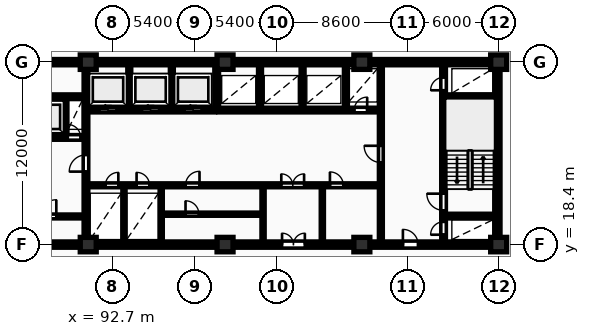
"""IFC4 building model, lengths in metres.
Left out: names, types, materials, properties, quantities, classifications, styles, units other than length and angle.
Written with IfcOpenShell. Run it as: python <this file> out.ifc"""

import sys

from ifc_helpers import new_model, si_unit, direction, frame, frame_2d, origin, origin_2d, place, context, subcontext, project, spatial, rectangle, extrude, element, fill, save


model = new_model("IFC4")
c1 = context("Model", 3, precision=1e-05, world=origin(), true_north=direction((0.0, 1.0)))
c2 = subcontext(c1, "Body", "Model", "MODEL_VIEW")
j1 = project(units=[si_unit("LENGTHUNIT", "METRE"), si_unit("PLANEANGLEUNIT", "RADIAN")], contexts=[c1])
p1 = place(None, origin())
s1 = spatial("IfcSite", under=j1, at=p1, CompositionType="ELEMENT")
p2 = place(p1, origin())
s2 = spatial("IfcBuilding", under=s1, at=p2, CompositionType="ELEMENT")
p3 = place(p2, frame((0.0, 0.0, -7.2)))
s3 = spatial("IfcBuildingStorey", under=s2, at=p3, CompositionType="ELEMENT", Elevation=-7.2)
for number, where, z_axis, x_axis in (
    (1, (91.1, 18.4, 0.0), (0.0, 0.0, 1.0), (1.0, 0.0, 0.0)),
    (2, (91.1, 30.4, 0.0), (0.0, 0.0, 1.0), (1.0, 0.0, 0.0)),
    (3, (100.1, 18.4, 0.0), (0.0, 0.0, 1.0), (1.0, 0.0, 0.0)),
    (4, (100.1, 30.4, 0.0), (0.0, 0.0, 1.0), (1.0, 0.0, 0.0)),
    (5, (109.1, 18.4, 0.0), (0.0, 0.0, 1.0), (1.0, 0.0, 0.0)),
    (6, (109.1, 30.4, 0.0), (0.0, 0.0, 1.0), (1.0, 0.0, 0.0)),
    (7, (118.1, 18.4, 0.0), (0.0, 0.0, 1.0), (1.0, 0.0, 0.0)),
    (8, (118.1, 30.4, 0.0), (0.0, 0.0, 1.0), (1.0, 0.0, 0.0)),
):
    element("IfcColumn", number, at=place(p3, frame(where, z_axis=z_axis, x_axis=x_axis)), inside=s3, PredefinedType="COLUMN", context=c2, shape_type="SweptSolid", body=[
        extrude(rectangle(XDim=1.05, YDim=0.95, at=origin_2d()), origin(), (0.0, 0.0, 1.0), 3.6),
    ])
p4 = place(p3, frame((81.925, 30.4, 0.0), z_axis=(0.0, 0.0, 1.0), x_axis=(1.0, 0.0, 0.0)))
e9 = element("IfcWall", 9, at=p4, inside=s3, PredefinedType="SHEAR", context=c2, shape_type="SweptSolid", body=[
    extrude(rectangle(XDim=36.265, YDim=0.35, at=frame_2d((18.132, 0.0))), origin(), (0.0, 0.0, 1.0), 3.6),
])
p5 = place(p3, frame((118.015, 18.575, 0.0), z_axis=(0.0, 0.0, 1.0), x_axis=(0.0, 1.0, 0.0)))
e10 = element("IfcWall", 10, at=p5, inside=s3, PredefinedType="SHEAR", context=c2, shape_type="SweptSolid", body=[
    extrude(rectangle(XDim=11.65, YDim=0.35, at=frame_2d((5.825, 0.0))), origin(), (0.0, 0.0, 1.0), 3.6),
])
p6 = place(p3, frame((81.925, 18.4, 0.0), z_axis=(0.0, 0.0, 1.0), x_axis=(1.0, 0.0, 0.0)))
e11 = element("IfcWall", 11, at=p6, inside=s3, PredefinedType="SHEAR", context=c2, shape_type="SweptSolid", body=[
    extrude(rectangle(XDim=36.265, YDim=0.35, at=frame_2d((18.132, 0.0))), origin(), (0.0, 0.0, 1.0), 3.6),
])
p7 = place(p6, frame((5.675, 0.0, 0.0)))
e12 = element("IfcOpeningElement", 12, at=p7, cuts=e11, PredefinedType="OPENING", context=c2, shape_type="SweptSolid", body=[
    extrude(rectangle(XDim=1.0, YDim=2.15, at=frame_2d((0.5, 1.075))), frame((0.0, 0.185, 0.0), z_axis=(0.0, -1.0, 0.0), x_axis=(1.0, 0.0, 0.0)), (0.0, 0.0, 1.0), 0.37),
])
p8 = place(p6, frame((21.925, 0.0, 0.0)))
e13 = element("IfcOpeningElement", 13, at=p8, cuts=e11, PredefinedType="OPENING", context=c2, shape_type="SweptSolid", body=[
    extrude(rectangle(XDim=1.5, YDim=2.2, at=frame_2d((0.75, 1.1))), frame((0.0, 0.185, 0.0), z_axis=(0.0, -1.0, 0.0), x_axis=(1.0, 0.0, 0.0)), (0.0, 0.0, 1.0), 0.37),
])
p9 = place(p6, frame((29.875, 0.0, 0.0)))
e14 = element("IfcOpeningElement", 14, at=p9, cuts=e11, PredefinedType="OPENING", context=c2, shape_type="SweptSolid", body=[
    extrude(rectangle(XDim=1.0, YDim=2.15, at=frame_2d((0.5, 1.075))), frame((0.0, 0.185, 0.0), z_axis=(0.0, -1.0, 0.0), x_axis=(1.0, 0.0, 0.0)), (0.0, 0.0, 1.0), 0.37),
])
p10 = place(p3, frame((83.0, 28.125, 0.0), z_axis=(0.0, 0.0, 1.0), x_axis=(1.0, 0.0, 0.0)))
e15 = element("IfcWall", 15, at=p10, inside=s3, PredefinedType="SHEAR", context=c2, shape_type="SweptSolid", body=[
    extrude(rectangle(XDim=7.82, YDim=0.25, at=frame_2d((3.91, 0.0))), origin(), (0.0, 0.0, 1.0), 3.6),
])
p11 = place(p3, frame((86.5, 25.45, 0.0), z_axis=(0.0, 0.0, 1.0), x_axis=(1.0, 0.0, 0.0)))
e16 = element("IfcWall", 16, at=p11, inside=s3, PredefinedType="SHEAR", context=c2, shape_type="SweptSolid", body=[
    extrude(rectangle(XDim=4.32, YDim=0.25, at=frame_2d((2.16, 0.0))), origin(), (0.0, 0.0, 1.0), 3.6),
])
p12 = place(p11, frame((1.14, 0.0, 0.0)))
e17 = element("IfcOpeningElement", 17, at=p12, cuts=e16, PredefinedType="OPENING", context=c2, shape_type="SweptSolid", body=[
    extrude(rectangle(XDim=1.12, YDim=2.12, at=frame_2d((0.56, 1.06))), frame((0.0, 0.135, 0.0), z_axis=(0.0, -1.0, 0.0), x_axis=(1.0, 0.0, 0.0)), (0.0, 0.0, 1.0), 0.27),
])
p13 = place(p11, frame((3.25, 0.0, 0.0)))
e18 = element("IfcOpeningElement", 18, at=p13, cuts=e16, PredefinedType="OPENING", context=c2, shape_type="SweptSolid", body=[
    extrude(rectangle(XDim=0.85, YDim=2.05, at=frame_2d((0.425, 1.025))), frame((0.0, 0.135, 0.0), z_axis=(0.0, -1.0, 0.0), x_axis=(1.0, 0.0, 0.0)), (0.0, 0.0, 1.0), 0.27),
])
p14 = place(p3, frame((89.6, 25.58, 0.0), z_axis=(0.0, 0.0, 1.0), x_axis=(0.0, 1.0, 0.0)))
e19 = element("IfcWall", 19, at=p14, inside=s3, PredefinedType="PARTITIONING", context=c2, shape_type="SweptSolid", body=[
    extrude(rectangle(XDim=2.42, YDim=0.2, at=frame_2d((1.21, 0.0))), origin(), (0.0, 0.0, 1.0), 3.3),
])
p15 = place(p3, frame((86.5, 20.25, 0.0), z_axis=(0.0, 0.0, 1.0), x_axis=(1.0, 0.0, 0.0)))
e20 = element("IfcWall", 20, at=p15, inside=s3, PredefinedType="PARTITIONING", context=c2, shape_type="SweptSolid", body=[
    extrude(rectangle(XDim=4.32, YDim=0.2, at=frame_2d((2.16, 0.0))), origin(), (0.0, 0.0, 1.0), 3.3),
])
p16 = place(p15, frame((1.4, 0.0, 0.0)))
e21 = element("IfcOpeningElement", 21, at=p16, cuts=e20, PredefinedType="OPENING", context=c2, shape_type="SweptSolid", body=[
    extrude(rectangle(XDim=1.1, YDim=2.1, at=frame_2d((0.55, 1.05))), frame((0.0, 0.11, 0.0), z_axis=(0.0, -1.0, 0.0), x_axis=(1.0, 0.0, 0.0)), (0.0, 0.0, 1.0), 0.22),
])
p17 = place(p3, frame((90.95, 18.6, 0.0), z_axis=(0.0, 0.0, 1.0), x_axis=(0.0, 1.0, 0.0)))
e22 = element("IfcWall", 22, at=p17, inside=s3, PredefinedType="SHEAR", context=c2, shape_type="SweptSolid", body=[
    extrude(rectangle(XDim=11.6, YDim=0.25, at=frame_2d((5.8, 0.0))), origin(), (0.0, 0.0, 1.0), 3.6),
])
p18 = place(p17, frame((4.6, 0.0, 0.0)))
e23 = element("IfcOpeningElement", 23, at=p18, cuts=e22, PredefinedType="OPENING", context=c2, shape_type="SweptSolid", body=[
    extrude(rectangle(XDim=1.1, YDim=2.1, at=frame_2d((0.55, 1.05))), frame((0.0, 0.135, 0.0), z_axis=(0.0, -1.0, 0.0), x_axis=(1.0, 0.0, 0.0)), (0.0, 0.0, 1.0), 0.27),
])
for number, where, z_axis, x_axis in (
    (24, (93.8, 27.38, 0.0), (0.0, 0.0, 1.0), (0.0, 1.0, 0.0)),
    (25, (96.6, 27.38, 0.0), (0.0, 0.0, 1.0), (0.0, 1.0, 0.0)),
):
    element("IfcWall", number, at=place(p3, frame(where, z_axis=z_axis, x_axis=x_axis)), inside=s3, PredefinedType="PARTITIONING", context=c2, shape_type="SweptSolid", body=[
        extrude(rectangle(XDim=2.82, YDim=0.2, at=frame_2d((1.41, 0.0))), origin(), (0.0, 0.0, 1.0), 3.3),
    ])
p19 = place(p3, frame((91.08, 27.25, 0.0), z_axis=(0.0, 0.0, 1.0), x_axis=(1.0, 0.0, 0.0)))
e26 = element("IfcWall", 26, at=p19, inside=s3, PredefinedType="SHEAR", context=c2, shape_type="SweptSolid", body=[
    extrude(rectangle(XDim=8.34, YDim=0.25, at=frame_2d((4.17, 0.0))), origin(), (0.0, 0.0, 1.0), 3.6),
])
p20 = place(p19, frame((0.76, 0.0, 0.0)))
e27 = element("IfcOpeningElement", 27, at=p20, cuts=e26, PredefinedType="OPENING", context=c2, shape_type="SweptSolid", body=[
    extrude(rectangle(XDim=1.12, YDim=2.12, at=frame_2d((0.56, 1.06))), frame((0.0, 0.135, 0.0), z_axis=(0.0, -1.0, 0.0), x_axis=(1.0, 0.0, 0.0)), (0.0, 0.0, 1.0), 0.27),
])
p21 = place(p19, frame((3.56, 0.0, 0.0)))
e28 = element("IfcOpeningElement", 28, at=p21, cuts=e26, PredefinedType="OPENING", context=c2, shape_type="SweptSolid", body=[
    extrude(rectangle(XDim=1.12, YDim=2.12, at=frame_2d((0.56, 1.06))), frame((0.0, 0.135, 0.0), z_axis=(0.0, -1.0, 0.0), x_axis=(1.0, 0.0, 0.0)), (0.0, 0.0, 1.0), 0.27),
])
p22 = place(p19, frame((6.36, 0.0, 0.0)))
e29 = element("IfcOpeningElement", 29, at=p22, cuts=e26, PredefinedType="OPENING", context=c2, shape_type="SweptSolid", body=[
    extrude(rectangle(XDim=1.12, YDim=2.12, at=frame_2d((0.56, 1.06))), frame((0.0, 0.135, 0.0), z_axis=(0.0, -1.0, 0.0), x_axis=(1.0, 0.0, 0.0)), (0.0, 0.0, 1.0), 0.27),
])
p23 = place(p3, frame((99.55, 27.25, 0.0), z_axis=(0.0, 0.0, 1.0), x_axis=(0.0, 1.0, 0.0)))
e30 = element("IfcWall", 30, at=p23, inside=s3, PredefinedType="SHEAR", context=c2, shape_type="SweptSolid", body=[
    extrude(rectangle(XDim=2.95, YDim=0.25, at=frame_2d((1.475, 0.0))), origin(), (0.0, 0.0, 1.0), 3.6),
])
for number, where, z_axis, x_axis in (
    (31, (102.4, 27.38, 0.0), (0.0, 0.0, 1.0), (0.0, 1.0, 0.0)),
    (32, (105.2, 27.38, 0.0), (0.0, 0.0, 1.0), (0.0, 1.0, 0.0)),
    (33, (108.05, 27.38, 0.0), (0.0, 0.0, 1.0), (0.0, 1.0, 0.0)),
):
    element("IfcWall", number, at=place(p3, frame(where, z_axis=z_axis, x_axis=x_axis)), inside=s3, PredefinedType="PARTITIONING", context=c2, shape_type="SweptSolid", body=[
        extrude(rectangle(XDim=2.82, YDim=0.2, at=frame_2d((1.41, 0.0))), origin(), (0.0, 0.0, 1.0), 3.3),
    ])
p24 = place(p3, frame((99.68, 27.25, 0.0), z_axis=(0.0, 0.0, 1.0), x_axis=(1.0, 0.0, 0.0)))
e34 = element("IfcWall", 34, at=p24, inside=s3, PredefinedType="SHEAR", context=c2, shape_type="SweptSolid", body=[
    extrude(rectangle(XDim=10.54, YDim=0.25, at=frame_2d((5.27, 0.0))), origin(), (0.0, 0.0, 1.0), 3.6),
])
p25 = place(p24, frame((8.92, 0.0, 0.0)))
e35 = element("IfcOpeningElement", 35, at=p25, cuts=e34, PredefinedType="OPENING", context=c2, shape_type="SweptSolid", body=[
    extrude(rectangle(XDim=0.85, YDim=2.05, at=frame_2d((0.425, 1.025))), frame((0.0, 0.135, 0.0), z_axis=(0.0, -1.0, 0.0), x_axis=(1.0, 0.0, 0.0)), (0.0, 0.0, 1.0), 0.27),
])
for number, where, z_axis, x_axis in (
    (36, (93.45, 18.6, 0.0), (0.0, 0.0, 1.0), (0.0, 1.0, 0.0)),
    (37, (95.9, 18.6, 0.0), (0.0, 0.0, 1.0), (0.0, 1.0, 0.0)),
):
    element("IfcWall", number, at=place(p3, frame(where, z_axis=z_axis, x_axis=x_axis)), inside=s3, PredefinedType="PARTITIONING", context=c2, shape_type="SweptSolid", body=[
        extrude(rectangle(XDim=3.6, YDim=0.15, at=frame_2d((1.8, 0.0))), origin(), (0.0, 0.0, 1.0), 3.3),
    ])
p26 = place(p3, frame((95.9, 20.4, 0.0), z_axis=(0.0, 0.0, 1.0), x_axis=(1.0, 0.0, 0.0)))
e38 = element("IfcWall", 38, at=p26, inside=s3, PredefinedType="PARTITIONING", context=c2, shape_type="SweptSolid", body=[
    extrude(rectangle(XDim=6.7, YDim=0.15, at=frame_2d((3.35, 0.0))), origin(), (0.0, 0.0, 1.0), 3.3),
])
p27 = place(p26, frame((1.6, 0.0, 0.0)))
e39 = element("IfcOpeningElement", 39, at=p27, cuts=e38, PredefinedType="OPENING", context=c2, shape_type="SweptSolid", body=[
    extrude(rectangle(XDim=0.88, YDim=2.06, at=frame_2d((0.44, 1.03))), frame((0.0, 0.085, 0.0), z_axis=(0.0, -1.0, 0.0), x_axis=(1.0, 0.0, 0.0)), (0.0, 0.0, 1.0), 0.17),
])
for number, where, z_axis, x_axis in (
    (40, (102.6, 18.6, 0.0), (0.0, 0.0, 1.0), (0.0, 1.0, 0.0)),
    (41, (106.5, 18.6, 0.0), (0.0, 0.0, 1.0), (0.0, 1.0, 0.0)),
):
    element("IfcWall", number, at=place(p3, frame(where, z_axis=z_axis, x_axis=x_axis)), inside=s3, PredefinedType="PARTITIONING", context=c2, shape_type="SweptSolid", body=[
        extrude(rectangle(XDim=3.6, YDim=0.15, at=frame_2d((1.8, 0.0))), origin(), (0.0, 0.0, 1.0), 3.3),
    ])
p28 = place(p3, frame((91.08, 22.3, 0.0), z_axis=(0.0, 0.0, 1.0), x_axis=(1.0, 0.0, 0.0)))
e42 = element("IfcWall", 42, at=p28, inside=s3, PredefinedType="PARTITIONING", context=c2, shape_type="SweptSolid", body=[
    extrude(rectangle(XDim=19.14, YDim=0.2, at=frame_2d((9.57, 0.0))), origin(), (0.0, 0.0, 1.0), 3.3),
])
p29 = place(p28, frame((1.15, 0.0, 0.0)))
e43 = element("IfcOpeningElement", 43, at=p29, cuts=e42, PredefinedType="OPENING", context=c2, shape_type="SweptSolid", body=[
    extrude(rectangle(XDim=0.85, YDim=2.05, at=frame_2d((0.425, 1.025))), frame((0.0, 0.11, 0.0), z_axis=(0.0, -1.0, 0.0), x_axis=(1.0, 0.0, 0.0)), (0.0, 0.0, 1.0), 0.22),
])
p30 = place(p28, frame((3.2, 0.0, 0.0)))
e44 = element("IfcOpeningElement", 44, at=p30, cuts=e42, PredefinedType="OPENING", context=c2, shape_type="SweptSolid", body=[
    extrude(rectangle(XDim=0.85, YDim=2.05, at=frame_2d((0.425, 1.025))), frame((0.0, 0.11, 0.0), z_axis=(0.0, -1.0, 0.0), x_axis=(1.0, 0.0, 0.0)), (0.0, 0.0, 1.0), 0.22),
])
p31 = place(p28, frame((12.72, 0.0, 0.0)))
e45 = element("IfcOpeningElement", 45, at=p31, cuts=e42, PredefinedType="OPENING", context=c2, shape_type="SweptSolid", body=[
    extrude(rectangle(XDim=1.5, YDim=2.2, at=frame_2d((0.75, 1.1))), frame((0.0, 0.11, 0.0), z_axis=(0.0, -1.0, 0.0), x_axis=(1.0, 0.0, 0.0)), (0.0, 0.0, 1.0), 0.22),
])
p32 = place(p28, frame((6.42, 0.0, 0.0)))
e46 = element("IfcOpeningElement", 46, at=p32, cuts=e42, PredefinedType="OPENING", context=c2, shape_type="SweptSolid", body=[
    extrude(rectangle(XDim=0.92, YDim=2.08, at=frame_2d((0.46, 1.04))), frame((0.0, 0.11, 0.0), z_axis=(0.0, -1.0, 0.0), x_axis=(1.0, 0.0, 0.0)), (0.0, 0.0, 1.0), 0.22),
])
p33 = place(p28, frame((15.92, 0.0, 0.0)))
e47 = element("IfcOpeningElement", 47, at=p33, cuts=e42, PredefinedType="OPENING", context=c2, shape_type="SweptSolid", body=[
    extrude(rectangle(XDim=0.88, YDim=2.06, at=frame_2d((0.44, 1.03))), frame((0.0, 0.11, 0.0), z_axis=(0.0, -1.0, 0.0), x_axis=(1.0, 0.0, 0.0)), (0.0, 0.0, 1.0), 0.22),
])
p34 = place(p3, frame((110.35, 18.6, 0.0), z_axis=(0.0, 0.0, 1.0), x_axis=(0.0, 1.0, 0.0)))
e48 = element("IfcWall", 48, at=p34, inside=s3, PredefinedType="PARTITIONING", context=c2, shape_type="SweptSolid", body=[
    extrude(rectangle(XDim=11.6, YDim=0.2, at=frame_2d((5.8, 0.0))), origin(), (0.0, 0.0, 1.0), 3.3),
])
p35 = place(p34, frame((5.2, 0.0, 0.0)))
e49 = element("IfcOpeningElement", 49, at=p35, cuts=e48, PredefinedType="OPENING", context=c2, shape_type="SweptSolid", body=[
    extrude(rectangle(XDim=1.1, YDim=2.15, at=frame_2d((0.55, 1.075))), frame((0.0, 0.11, 0.0), z_axis=(0.0, -1.0, 0.0), x_axis=(1.0, 0.0, 0.0)), (0.0, 0.0, 1.0), 0.22),
])
p36 = place(p3, frame((114.475, 18.6, 0.0), z_axis=(0.0, 0.0, 1.0), x_axis=(0.0, 1.0, 0.0)))
e50 = element("IfcWall", 50, at=p36, inside=s3, PredefinedType="SHEAR", context=c2, shape_type="SweptSolid", body=[
    extrude(rectangle(XDim=11.6, YDim=0.25, at=frame_2d((5.8, 0.0))), origin(), (0.0, 0.0, 1.0), 3.6),
])
p37 = place(p36, frame((0.45, 0.0, 0.0)))
e51 = element("IfcOpeningElement", 51, at=p37, cuts=e50, PredefinedType="OPENING", context=c2, shape_type="SweptSolid", body=[
    extrude(rectangle(XDim=0.85, YDim=2.05, at=frame_2d((0.425, 1.025))), frame((0.0, 0.135, 0.0), z_axis=(0.0, -1.0, 0.0), x_axis=(1.0, 0.0, 0.0)), (0.0, 0.0, 1.0), 0.27),
])
p38 = place(p36, frame((2.05, 0.0, 0.0)))
e52 = element("IfcOpeningElement", 52, at=p38, cuts=e50, PredefinedType="OPENING", context=c2, shape_type="SweptSolid", body=[
    extrude(rectangle(XDim=1.1, YDim=2.1, at=frame_2d((0.55, 1.05))), frame((0.0, 0.135, 0.0), z_axis=(0.0, -1.0, 0.0), x_axis=(1.0, 0.0, 0.0)), (0.0, 0.0, 1.0), 0.27),
])
p39 = place(p36, frame((9.95, 0.0, 0.0)))
e53 = element("IfcOpeningElement", 53, at=p39, cuts=e50, PredefinedType="OPENING", context=c2, shape_type="SweptSolid", body=[
    extrude(rectangle(XDim=0.85, YDim=2.05, at=frame_2d((0.425, 1.025))), frame((0.0, 0.135, 0.0), z_axis=(0.0, -1.0, 0.0), x_axis=(1.0, 0.0, 0.0)), (0.0, 0.0, 1.0), 0.27),
])
for number, where, z_axis, x_axis in (
    (54, (114.6, 20.275, 0.0), (0.0, 0.0, 1.0), (1.0, 0.0, 0.0)),
    (55, (114.6, 28.125, 0.0), (0.0, 0.0, 1.0), (1.0, 0.0, 0.0)),
):
    element("IfcWall", number, at=place(p3, frame(where, z_axis=z_axis, x_axis=x_axis)), inside=s3, PredefinedType="SHEAR", context=c2, shape_type="SweptSolid", body=[
        extrude(rectangle(XDim=3.24, YDim=0.25, at=frame_2d((1.62, 0.0))), origin(), (0.0, 0.0, 1.0), 3.6),
    ])
p40 = place(p8, origin())
e56 = element("IfcDoor", 56, at=p40, inside=s3, OperationType="DOUBLE_DOOR_SINGLE_SWING", PredefinedType="DOOR", context=c2, shape_type="SweptSolid", body=[
    extrude(rectangle(XDim=1.5, YDim=2.2, at=frame_2d((0.75, 1.1))), frame((0.0, 0.025, 0.0), z_axis=(0.0, -1.0, 0.0), x_axis=(1.0, 0.0, 0.0)), (0.0, 0.0, 1.0), 0.05),
])
fill(e13, e56)
p41 = place(p9, origin())
e57 = element("IfcDoor", 57, at=p41, inside=s3, OperationType="SINGLE_SWING_LEFT", PredefinedType="DOOR", context=c2, shape_type="SweptSolid", body=[
    extrude(rectangle(XDim=1.0, YDim=2.15, at=frame_2d((0.5, 1.075))), frame((0.0, 0.025, 0.0), z_axis=(0.0, -1.0, 0.0), x_axis=(1.0, 0.0, 0.0)), (0.0, 0.0, 1.0), 0.05),
])
fill(e14, e57)
p42 = place(p12, origin())
e58 = element("IfcDoor", 58, at=p42, inside=s3, OperationType="SLIDING_TO_RIGHT", PredefinedType="DOOR", context=c2, shape_type="SweptSolid", body=[
    extrude(rectangle(XDim=1.12, YDim=2.12, at=frame_2d((0.56, 1.06))), frame((0.0, 0.025, 0.0), z_axis=(0.0, -1.0, 0.0), x_axis=(1.0, 0.0, 0.0)), (0.0, 0.0, 1.0), 0.05),
])
fill(e17, e58)
p43 = place(p13, origin())
e59 = element("IfcDoor", 59, at=p43, inside=s3, OperationType="SINGLE_SWING_LEFT", PredefinedType="DOOR", context=c2, shape_type="SweptSolid", body=[
    extrude(rectangle(XDim=0.85, YDim=2.05, at=frame_2d((0.425, 1.025))), frame((0.0, 0.025, 0.0), z_axis=(0.0, -1.0, 0.0), x_axis=(1.0, 0.0, 0.0)), (0.0, 0.0, 1.0), 0.05),
])
fill(e18, e59)
p44 = place(p16, origin())
e60 = element("IfcDoor", 60, at=p44, inside=s3, OperationType="SINGLE_SWING_RIGHT", PredefinedType="DOOR", context=c2, shape_type="SweptSolid", body=[
    extrude(rectangle(XDim=1.1, YDim=2.1, at=frame_2d((0.55, 1.05))), frame((0.0, 0.025, 0.0), z_axis=(0.0, -1.0, 0.0), x_axis=(1.0, 0.0, 0.0)), (0.0, 0.0, 1.0), 0.05),
])
fill(e21, e60)
p45 = place(p18, origin())
e61 = element("IfcDoor", 61, at=p45, inside=s3, OperationType="SINGLE_SWING_LEFT", PredefinedType="DOOR", context=c2, shape_type="SweptSolid", body=[
    extrude(rectangle(XDim=1.1, YDim=2.1, at=frame_2d((0.55, 1.05))), frame((0.0, 0.025, 0.0), z_axis=(0.0, -1.0, 0.0), x_axis=(1.0, 0.0, 0.0)), (0.0, 0.0, 1.0), 0.05),
])
fill(e23, e61)
p46 = place(p20, origin())
e62 = element("IfcDoor", 62, at=p46, inside=s3, OperationType="SLIDING_TO_LEFT", PredefinedType="DOOR", context=c2, shape_type="SweptSolid", body=[
    extrude(rectangle(XDim=1.12, YDim=2.12, at=frame_2d((0.56, 1.06))), frame((0.0, 0.025, 0.0), z_axis=(0.0, -1.0, 0.0), x_axis=(1.0, 0.0, 0.0)), (0.0, 0.0, 1.0), 0.05),
])
fill(e27, e62)
p47 = place(p21, origin())
e63 = element("IfcDoor", 63, at=p47, inside=s3, OperationType="SLIDING_TO_LEFT", PredefinedType="DOOR", context=c2, shape_type="SweptSolid", body=[
    extrude(rectangle(XDim=1.12, YDim=2.12, at=frame_2d((0.56, 1.06))), frame((0.0, 0.025, 0.0), z_axis=(0.0, -1.0, 0.0), x_axis=(1.0, 0.0, 0.0)), (0.0, 0.0, 1.0), 0.05),
])
fill(e28, e63)
p48 = place(p22, origin())
e64 = element("IfcDoor", 64, at=p48, inside=s3, OperationType="SLIDING_TO_LEFT", PredefinedType="DOOR", context=c2, shape_type="SweptSolid", body=[
    extrude(rectangle(XDim=1.12, YDim=2.12, at=frame_2d((0.56, 1.06))), frame((0.0, 0.025, 0.0), z_axis=(0.0, -1.0, 0.0), x_axis=(1.0, 0.0, 0.0)), (0.0, 0.0, 1.0), 0.05),
])
fill(e29, e64)
p49 = place(p25, origin())
e65 = element("IfcDoor", 65, at=p49, inside=s3, OperationType="SINGLE_SWING_RIGHT", PredefinedType="DOOR", context=c2, shape_type="SweptSolid", body=[
    extrude(rectangle(XDim=0.85, YDim=2.05, at=frame_2d((0.425, 1.025))), frame((0.0, 0.025, 0.0), z_axis=(0.0, -1.0, 0.0), x_axis=(1.0, 0.0, 0.0)), (0.0, 0.0, 1.0), 0.05),
])
fill(e35, e65)
p50 = place(p27, origin())
e66 = element("IfcDoor", 66, at=p50, inside=s3, OperationType="SINGLE_SWING_LEFT", PredefinedType="DOOR", context=c2, shape_type="SweptSolid", body=[
    extrude(rectangle(XDim=0.88, YDim=2.06, at=frame_2d((0.44, 1.03))), frame((0.0, 0.025, 0.0), z_axis=(0.0, -1.0, 0.0), x_axis=(1.0, 0.0, 0.0)), (0.0, 0.0, 1.0), 0.05),
])
fill(e39, e66)
p51 = place(p29, origin())
e67 = element("IfcDoor", 67, at=p51, inside=s3, OperationType="SINGLE_SWING_RIGHT", PredefinedType="DOOR", context=c2, shape_type="SweptSolid", body=[
    extrude(rectangle(XDim=0.85, YDim=2.05, at=frame_2d((0.425, 1.025))), frame((0.0, 0.025, 0.0), z_axis=(0.0, -1.0, 0.0), x_axis=(1.0, 0.0, 0.0)), (0.0, 0.0, 1.0), 0.05),
])
fill(e43, e67)
p52 = place(p30, origin())
e68 = element("IfcDoor", 68, at=p52, inside=s3, OperationType="SINGLE_SWING_LEFT", PredefinedType="DOOR", context=c2, shape_type="SweptSolid", body=[
    extrude(rectangle(XDim=0.85, YDim=2.05, at=frame_2d((0.425, 1.025))), frame((0.0, 0.025, 0.0), z_axis=(0.0, -1.0, 0.0), x_axis=(1.0, 0.0, 0.0)), (0.0, 0.0, 1.0), 0.05),
])
fill(e44, e68)
p53 = place(p31, origin())
e69 = element("IfcDoor", 69, at=p53, inside=s3, OperationType="DOUBLE_DOOR_SINGLE_SWING", PredefinedType="DOOR", context=c2, shape_type="SweptSolid", body=[
    extrude(rectangle(XDim=1.5, YDim=2.2, at=frame_2d((0.75, 1.1))), frame((0.0, 0.025, 0.0), z_axis=(0.0, -1.0, 0.0), x_axis=(1.0, 0.0, 0.0)), (0.0, 0.0, 1.0), 0.05),
])
fill(e45, e69)
p54 = place(p32, origin())
e70 = element("IfcDoor", 70, at=p54, inside=s3, OperationType="SINGLE_SWING_RIGHT", PredefinedType="DOOR", context=c2, shape_type="SweptSolid", body=[
    extrude(rectangle(XDim=0.92, YDim=2.08, at=frame_2d((0.46, 1.04))), frame((0.0, 0.025, 0.0), z_axis=(0.0, -1.0, 0.0), x_axis=(1.0, 0.0, 0.0)), (0.0, 0.0, 1.0), 0.05),
])
fill(e46, e70)
p55 = place(p33, origin())
e71 = element("IfcDoor", 71, at=p55, inside=s3, OperationType="SINGLE_SWING_LEFT", PredefinedType="DOOR", context=c2, shape_type="SweptSolid", body=[
    extrude(rectangle(XDim=0.88, YDim=2.06, at=frame_2d((0.44, 1.03))), frame((0.0, 0.025, 0.0), z_axis=(0.0, -1.0, 0.0), x_axis=(1.0, 0.0, 0.0)), (0.0, 0.0, 1.0), 0.05),
])
fill(e47, e71)
p56 = place(p35, origin())
e72 = element("IfcDoor", 72, at=p56, inside=s3, OperationType="SINGLE_SWING_RIGHT", PredefinedType="DOOR", context=c2, shape_type="SweptSolid", body=[
    extrude(rectangle(XDim=1.1, YDim=2.15, at=frame_2d((0.55, 1.075))), frame((0.0, 0.025, 0.0), z_axis=(0.0, -1.0, 0.0), x_axis=(1.0, 0.0, 0.0)), (0.0, 0.0, 1.0), 0.05),
])
fill(e49, e72)
p57 = place(p37, origin())
e73 = element("IfcDoor", 73, at=p57, inside=s3, OperationType="SINGLE_SWING_LEFT", PredefinedType="DOOR", context=c2, shape_type="SweptSolid", body=[
    extrude(rectangle(XDim=0.85, YDim=2.05, at=frame_2d((0.425, 1.025))), frame((0.0, 0.025, 0.0), z_axis=(0.0, -1.0, 0.0), x_axis=(1.0, 0.0, 0.0)), (0.0, 0.0, 1.0), 0.05),
])
fill(e51, e73)
p58 = place(p38, origin())
e74 = element("IfcDoor", 74, at=p58, inside=s3, OperationType="SINGLE_SWING_RIGHT", PredefinedType="DOOR", context=c2, shape_type="SweptSolid", body=[
    extrude(rectangle(XDim=1.1, YDim=2.1, at=frame_2d((0.55, 1.05))), frame((0.0, 0.025, 0.0), z_axis=(0.0, -1.0, 0.0), x_axis=(1.0, 0.0, 0.0)), (0.0, 0.0, 1.0), 0.05),
])
fill(e52, e74)
p59 = place(p39, origin())
e75 = element("IfcDoor", 75, at=p59, inside=s3, OperationType="SINGLE_SWING_LEFT", PredefinedType="DOOR", context=c2, shape_type="SweptSolid", body=[
    extrude(rectangle(XDim=0.85, YDim=2.05, at=frame_2d((0.425, 1.025))), frame((0.0, 0.025, 0.0), z_axis=(0.0, -1.0, 0.0), x_axis=(1.0, 0.0, 0.0)), (0.0, 0.0, 1.0), 0.05),
])
fill(e53, e75)
save(model, sys.argv[1])
